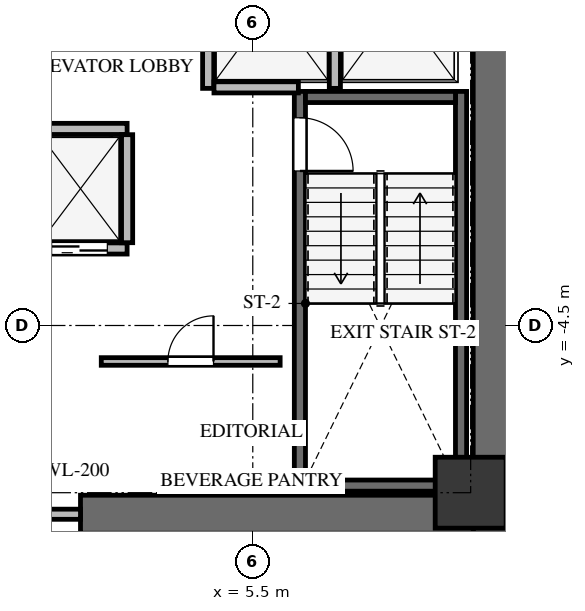
"""IFC4 building model, lengths in metres.
Left out: names, types, materials, properties, quantities, classifications, styles, units other than length and angle.
Written with IfcOpenShell. Run it as: python <this file> out.ifc"""

import sys

from ifc_helpers import new_model, si_unit, direction, frame, frame_2d, origin, origin_2d, place, context, subcontext, project, spatial, rectangle, extrude, source, transform, mapped, element, fill, save


model = new_model("IFC4")
c1 = context("Model", 3, precision=1e-05, world=origin(), true_north=direction((0.0, 1.0)))
c2 = subcontext(c1, "Body", "Model", "MODEL_VIEW")
j1 = project(units=[si_unit("LENGTHUNIT", "METRE"), si_unit("PLANEANGLEUNIT", "RADIAN")], contexts=[c1])
p1 = place(None, origin())
s1 = spatial("IfcSite", under=j1, at=p1, CompositionType="ELEMENT")
p2 = place(p1, origin())
s2 = spatial("IfcBuilding", under=s1, at=p2, CompositionType="ELEMENT")
p3 = place(p2, frame((0.0, 0.0, 100.8)))
s3 = spatial("IfcBuildingStorey", under=s2, at=p3, CompositionType="ELEMENT", Elevation=100.8)
p4 = place(p3, frame((10.225, -8.6, 0.0), z_axis=(0.0, 0.0, 1.0), x_axis=(0.0, 1.0, 0.0)))
e1 = element("IfcWall", 1, at=p4, inside=s3, PredefinedType="SHEAR", context=c2, shape_type="SweptSolid", body=[
    extrude(rectangle(XDim=17.2, YDim=0.75, at=frame_2d((8.6, 0.0))), origin(), (0.0, 0.0, 1.0), 3.3),
])
p5 = place(p3, frame((2.1, -8.225, 0.0), z_axis=(0.0, 0.0, 1.0), x_axis=(1.0, 0.0, 0.0)))
e2 = element("IfcWall", 2, at=p5, inside=s3, PredefinedType="SHEAR", context=c2, shape_type="SweptSolid", body=[
    extrude(rectangle(XDim=7.75, YDim=0.75, at=frame_2d((3.875, 0.0))), origin(), (0.0, 0.0, 1.0), 3.3),
])
p6 = place(p3, frame((9.61, -7.77, -0.24), z_axis=(0.0, 0.0, 1.0), x_axis=(0.0, 1.0, 0.0)))
e3 = element("IfcWall", 3, at=p6, inside=s3, PredefinedType="SHEAR", context=c2, shape_type="SweptSolid", body=[
    extrude(rectangle(XDim=7.89, YDim=0.22, at=frame_2d((3.945, 0.0))), origin(), (0.0, 0.0, 1.0), 3.3),
])
p7 = place(p3, frame((6.43, 0.12, -0.24), z_axis=(0.0, 0.0, 1.0), x_axis=(0.0, -1.0, 0.0)))
e4 = element("IfcWall", 4, at=p7, inside=s3, PredefinedType="SHEAR", context=c2, shape_type="SweptSolid", body=[
    extrude(rectangle(XDim=7.89, YDim=0.22, at=frame_2d((3.945, 0.0))), origin(), (0.0, 0.0, 1.0), 3.3),
])
p8 = place(p7, frame((0.52, 0.0, 0.0)))
e5 = element("IfcOpeningElement", 5, at=p8, cuts=e4, PredefinedType="OPENING", context=c2, shape_type="SweptSolid", body=[
    extrude(rectangle(XDim=1.05, YDim=2.15, at=frame_2d((0.525, 1.075))), frame((0.0, 0.12, 0.0), z_axis=(0.0, -1.0, 0.0), x_axis=(1.0, 0.0, 0.0)), (0.0, 0.0, 1.0), 0.24),
])
for number, where, z_axis, x_axis in (
    (6, (6.54, -7.66, -0.24), (0.0, 0.0, 1.0), (1.0, 0.0, 0.0)),
    (7, (9.5, 0.01, -0.24), (0.0, 0.0, 1.0), (-1.0, 0.0, 0.0)),
):
    element("IfcWall", number, at=place(p3, frame(where, z_axis=z_axis, x_axis=x_axis)), inside=s3, PredefinedType="SHEAR", context=c2, shape_type="SweptSolid", body=[
        extrude(rectangle(XDim=2.96, YDim=0.22, at=frame_2d((1.48, 0.0))), origin(), (0.0, 0.0, 1.0), 3.3),
    ])
m1 = source(origin(), c2, "Body", "SweptSolid", [
    extrude(rectangle(XDim=1.4, YDim=1.4, at=origin_2d()), origin(), (0.0, 0.0, 1.0), 3.3),
])
p9 = place(p3, frame((9.8, -7.8, -0.24), z_axis=(0.0, 0.0, 1.0), x_axis=(1.0, 0.0, 0.0)))
e8 = element("IfcColumn", 8, at=p9, inside=s3, PredefinedType="COLUMN", context=c2, shape_type="MappedRepresentation", body=[
    mapped(m1, transform((0.0, 0.0, 0.0), x_axis=(1.0, 0.0, 0.0), y_axis=(0.0, 1.0, 0.0), z_axis=(0.0, 0.0, 1.0), scale=1.0)),
])
p10 = place(p3, frame((-2.1, -8.225, 0.0), z_axis=(0.0, 0.0, 1.0), x_axis=(1.0, 0.0, 0.0)))
e9 = element("IfcWall", 9, at=p10, inside=s3, PredefinedType="SOLIDWALL", context=c2, shape_type="SweptSolid", body=[
    extrude(rectangle(XDim=4.2, YDim=0.2, at=frame_2d((2.1, 0.0))), origin(), (0.0, 0.0, 1.0), 3.045),
])
p11 = place(p10, frame((1.2, 0.0, 0.0)))
e10 = element("IfcOpeningElement", 10, at=p11, cuts=e9, PredefinedType="OPENING", context=c2, shape_type="SweptSolid", body=[
    extrude(rectangle(XDim=1.8, YDim=2.15, at=frame_2d((0.9, 1.075))), frame((0.0, 0.11, 0.0), z_axis=(0.0, -1.0, 0.0), x_axis=(1.0, 0.0, 0.0)), (0.0, 0.0, 1.0), 0.22),
])
for number, where, z_axis, x_axis in (
    (11, (4.62, 0.18, 0.0), (0.0, 0.0, 1.0), (0.0, 1.0, 0.0)),
    (12, (7.12, 0.18, 0.0), (0.0, 0.0, 1.0), (0.0, 1.0, 0.0)),
):
    element("IfcWall", number, at=place(p3, frame(where, z_axis=z_axis, x_axis=x_axis)), inside=s3, PredefinedType="SOLIDWALL", context=c2, shape_type="SweptSolid", body=[
        extrude(rectangle(XDim=3.186, YDim=0.22, at=frame_2d((1.593, 0.0))), origin(), (0.0, 0.0, 1.0), 3.045),
    ])
p12 = place(p3, frame((4.734, 0.2, 0.0), z_axis=(0.0, 0.0, 1.0), x_axis=(1.0, 0.0, 0.0)))
e13 = element("IfcWall", 13, at=p12, inside=s3, PredefinedType="SOLIDWALL", context=c2, shape_type="SweptSolid", body=[
    extrude(rectangle(XDim=1.666, YDim=0.22, at=frame_2d((0.833, 0.0))), origin(), (0.0, 0.0, 1.0), 3.045),
])
p13 = place(p3, frame((-4.22, -2.98, 0.0), z_axis=(0.0, 0.0, 1.0), x_axis=(1.0, 0.0, 0.0)))
e14 = element("IfcWall", 14, at=p13, inside=s3, PredefinedType="SOLIDWALL", context=c2, shape_type="SweptSolid", body=[
    extrude(rectangle(XDim=7.24, YDim=0.22, at=frame_2d((3.62, 0.0))), origin(), (0.0, 0.0, 1.0), 3.045),
])
p14 = place(p13, frame((0.35, 0.0, 0.0)))
e15 = element("IfcOpeningElement", 15, at=p14, cuts=e14, PredefinedType="OPENING", context=c2, shape_type="SweptSolid", body=[
    extrude(rectangle(XDim=1.1, YDim=2.15, at=frame_2d((0.55, 1.075))), frame((0.0, 0.12, 0.0), z_axis=(0.0, -1.0, 0.0), x_axis=(1.0, 0.0, 0.0)), (0.0, 0.0, 1.0), 0.24),
])
p15 = place(p13, frame((2.15, 0.0, 0.0)))
e16 = element("IfcOpeningElement", 16, at=p15, cuts=e14, PredefinedType="OPENING", context=c2, shape_type="SweptSolid", body=[
    extrude(rectangle(XDim=1.1, YDim=2.15, at=frame_2d((0.55, 1.075))), frame((0.0, 0.12, 0.0), z_axis=(0.0, -1.0, 0.0), x_axis=(1.0, 0.0, 0.0)), (0.0, 0.0, 1.0), 0.24),
])
p16 = place(p13, frame((3.95, 0.0, 0.0)))
e17 = element("IfcOpeningElement", 17, at=p16, cuts=e14, PredefinedType="OPENING", context=c2, shape_type="SweptSolid", body=[
    extrude(rectangle(XDim=1.1, YDim=2.15, at=frame_2d((0.55, 1.075))), frame((0.0, 0.12, 0.0), z_axis=(0.0, -1.0, 0.0), x_axis=(1.0, 0.0, 0.0)), (0.0, 0.0, 1.0), 0.24),
])
p17 = place(p13, frame((5.75, 0.0, 0.0)))
e18 = element("IfcOpeningElement", 18, at=p17, cuts=e14, PredefinedType="OPENING", context=c2, shape_type="SweptSolid", body=[
    extrude(rectangle(XDim=1.1, YDim=2.15, at=frame_2d((0.55, 1.075))), frame((0.0, 0.12, 0.0), z_axis=(0.0, -1.0, 0.0), x_axis=(1.0, 0.0, 0.0)), (0.0, 0.0, 1.0), 0.24),
])
p18 = place(p3, frame((-4.22, -0.62, 0.0), z_axis=(0.0, 0.0, 1.0), x_axis=(1.0, 0.0, 0.0)))
e19 = element("IfcWall", 19, at=p18, inside=s3, PredefinedType="SOLIDWALL", context=c2, shape_type="SweptSolid", body=[
    extrude(rectangle(XDim=7.24, YDim=0.22, at=frame_2d((3.62, 0.0))), origin(), (0.0, 0.0, 1.0), 3.045),
])
p19 = place(p3, frame((3.02, -2.866, 0.0), z_axis=(0.0, 0.0, 1.0), x_axis=(0.0, 1.0, 0.0)))
e20 = element("IfcWall", 20, at=p19, inside=s3, PredefinedType="SOLIDWALL", context=c2, shape_type="SweptSolid", body=[
    extrude(rectangle(XDim=2.132, YDim=0.22, at=frame_2d((1.066, 0.0))), origin(), (0.0, 0.0, 1.0), 3.045),
])
p20 = place(p3, frame((2.51, -5.21, 0.0), z_axis=(0.0, 0.0, 1.0), x_axis=(1.0, 0.0, 0.0)))
e21 = element("IfcWall", 21, at=p20, inside=s3, PredefinedType="PARTITIONING", context=c2, shape_type="SweptSolid", body=[
    extrude(rectangle(XDim=3.53, YDim=0.15, at=frame_2d((1.765, 0.0))), origin(), (0.0, 0.0, 1.0), 3.045),
])
p21 = place(p20, frame((1.315, 0.0, 0.0)))
e22 = element("IfcOpeningElement", 22, at=p21, cuts=e21, PredefinedType="OPENING", context=c2, shape_type="SweptSolid", body=[
    extrude(rectangle(XDim=0.9, YDim=2.05, at=frame_2d((0.45, 1.025))), frame((0.0, 0.085, 0.0), z_axis=(0.0, -1.0, 0.0), x_axis=(1.0, 0.0, 0.0)), (0.0, 0.0, 1.0), 0.17),
])
m2 = source(origin(), c2, "Body", "SweptSolid", [
    extrude(rectangle(XDim=1.05, YDim=2.15, at=frame_2d((0.525, 1.075))), frame((0.0, 0.025, 0.0), z_axis=(0.0, -1.0, 0.0), x_axis=(1.0, 0.0, 0.0)), (0.0, 0.0, 1.0), 0.05),
])
p22 = place(p8, origin())
e23 = element("IfcDoor", 23, at=p22, inside=s3, OperationType="SINGLE_SWING_RIGHT", PredefinedType="DOOR", context=c2, shape_type="MappedRepresentation", body=[
    mapped(m2, transform((0.0, 0.0, 0.0), x_axis=(1.0, 0.0, 0.0), y_axis=(0.0, 1.0, 0.0), z_axis=(0.0, 0.0, 1.0), scale=1.0)),
])
fill(e5, e23)
m3 = source(origin(), c2, "Body", "SweptSolid", [
    extrude(rectangle(XDim=1.1, YDim=2.15, at=frame_2d((0.55, 1.075))), frame((0.0, 0.025, 0.0), z_axis=(0.0, -1.0, 0.0), x_axis=(1.0, 0.0, 0.0)), (0.0, 0.0, 1.0), 0.05),
])
p23 = place(p17, origin())
e24 = element("IfcDoor", 24, at=p23, inside=s3, OperationType="DOUBLE_DOOR_SLIDING", PredefinedType="DOOR", context=c2, shape_type="MappedRepresentation", body=[
    mapped(m3, transform((0.0, 0.0, 0.0), x_axis=(1.0, 0.0, 0.0), y_axis=(0.0, 1.0, 0.0), z_axis=(0.0, 0.0, 1.0), scale=1.0)),
])
fill(e18, e24)
m4 = source(origin(), c2, "Body", "SweptSolid", [
    extrude(rectangle(XDim=0.9, YDim=2.05, at=frame_2d((0.45, 1.025))), frame((0.0, 0.025, 0.0), z_axis=(0.0, -1.0, 0.0), x_axis=(1.0, 0.0, 0.0)), (0.0, 0.0, 1.0), 0.05),
])
p24 = place(p21, origin())
e25 = element("IfcDoor", 25, at=p24, inside=s3, OperationType="SINGLE_SWING_RIGHT", PredefinedType="DOOR", context=c2, shape_type="MappedRepresentation", body=[
    mapped(m4, transform((0.0, 0.0, 0.0), x_axis=(1.0, 0.0, 0.0), y_axis=(0.0, 1.0, 0.0), z_axis=(0.0, 0.0, 1.0), scale=1.0)),
])
fill(e22, e25)
save(model, sys.argv[1])
